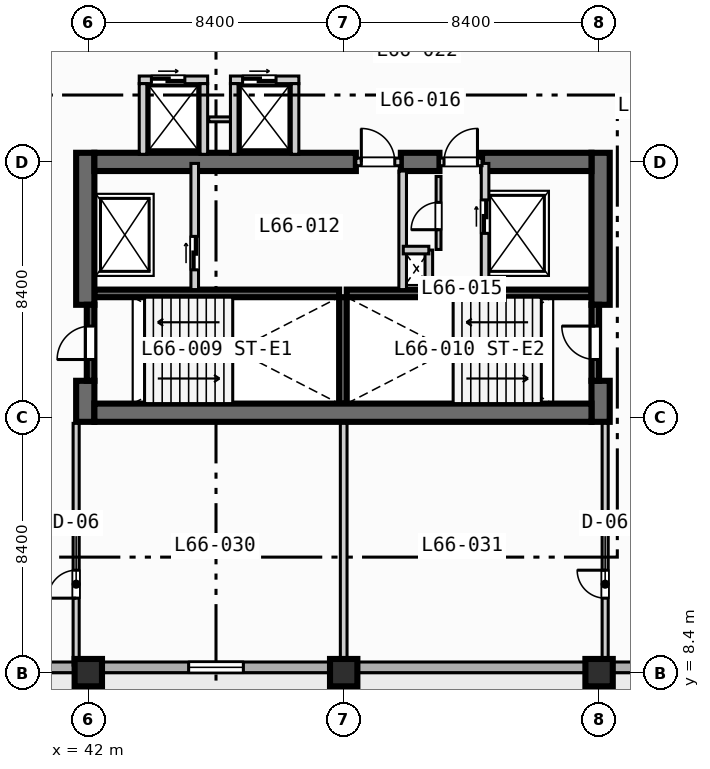
"""IFC4 building model, lengths in metres.
Left out: names, types, materials, properties, quantities, classifications, styles, units other than length and angle.
Written with IfcOpenShell. Run it as: python <this file> out.ifc"""

import sys

from ifc_helpers import new_model, si_unit, direction, frame, frame_2d, origin, origin_2d, place, context, subcontext, project, spatial, rectangle, extrude, element, fill, save


model = new_model("IFC4")
c1 = context("Model", 3, precision=1e-05, world=origin(), true_north=direction((0.0, 1.0)))
c2 = subcontext(c1, "Body", "Model", "MODEL_VIEW")
j1 = project(units=[si_unit("LENGTHUNIT", "METRE"), si_unit("PLANEANGLEUNIT", "RADIAN")], contexts=[c1])
p1 = place(None, origin())
s1 = spatial("IfcSite", under=j1, at=p1, CompositionType="ELEMENT")
p2 = place(p1, origin())
s2 = spatial("IfcBuilding", under=s1, at=p2, CompositionType="ELEMENT")
p3 = place(p2, frame((0.0, 0.0, 267.5)))
s3 = spatial("IfcBuildingStorey", under=s2, at=p3, CompositionType="ELEMENT", Elevation=267.5)
for number, where, z_axis, x_axis in (
    (1, (42.2, 20.875, 0.0), (0.0, 0.0, 1.0), (1.0, 0.0, 0.0)),
    (2, (50.5, 20.875, 0.0), (0.0, 0.0, 1.0), (1.0, 0.0, 0.0)),
):
    element("IfcWall", number, at=place(p3, frame(where, z_axis=z_axis, x_axis=x_axis)), inside=s3, PredefinedType="SOLIDWALL", context=c2, shape_type="SweptSolid", body=[
        extrude(rectangle(XDim=8.05, YDim=0.25, at=frame_2d((4.025, 0.0))), origin(), (0.0, 0.0, 1.0), 3.47),
    ])
p4 = place(p3, frame((50.375, 17.25, 0.0), z_axis=(0.0, 0.0, 1.0), x_axis=(0.0, 1.0, 0.0)))
e3 = element("IfcWall", 3, at=p4, inside=s3, PredefinedType="SOLIDWALL", context=c2, shape_type="SweptSolid", body=[
    extrude(rectangle(XDim=3.5, YDim=0.25, at=frame_2d((1.75, 0.0))), origin(), (0.0, 0.0, 1.0), 3.47),
])
p5 = place(p3, frame((41.9, 16.65, 0.0), z_axis=(0.0, 0.0, 1.0), x_axis=(0.0, 1.0, 0.0)))
e4 = element("IfcWall", 4, at=p5, inside=s3, PredefinedType="SHEAR", context=c2, shape_type="SweptSolid", body=[
    extrude(rectangle(XDim=1.35, YDim=0.6, at=frame_2d((0.675, 0.0))), origin(), (0.0, 0.0, 1.0), 3.47),
])
p6 = place(p3, frame((41.9, 20.5, 0.0), z_axis=(0.0, 0.0, 1.0), x_axis=(0.0, 1.0, 0.0)))
e5 = element("IfcWall", 5, at=p6, inside=s3, PredefinedType="SHEAR", context=c2, shape_type="SweptSolid", body=[
    extrude(rectangle(XDim=5.0, YDim=0.6, at=frame_2d((2.5, 0.0))), origin(), (0.0, 0.0, 1.0), 3.47),
])
p7 = place(p3, frame((58.85, 16.65, 0.0), z_axis=(0.0, 0.0, 1.0), x_axis=(0.0, 1.0, 0.0)))
e6 = element("IfcWall", 6, at=p7, inside=s3, PredefinedType="SHEAR", context=c2, shape_type="SweptSolid", body=[
    extrude(rectangle(XDim=1.35, YDim=0.6, at=frame_2d((0.675, 0.0))), origin(), (0.0, 0.0, 1.0), 3.47),
])
p8 = place(p3, frame((58.85, 20.5, 0.0), z_axis=(0.0, 0.0, 1.0), x_axis=(0.0, 1.0, 0.0)))
e7 = element("IfcWall", 7, at=p8, inside=s3, PredefinedType="SHEAR", context=c2, shape_type="SweptSolid", body=[
    extrude(rectangle(XDim=5.0, YDim=0.6, at=frame_2d((2.5, 0.0))), origin(), (0.0, 0.0, 1.0), 3.47),
])
p9 = place(p3, frame((42.2, 16.95, 0.0), z_axis=(0.0, 0.0, 1.0), x_axis=(1.0, 0.0, 0.0)))
e8 = element("IfcWall", 8, at=p9, inside=s3, PredefinedType="SHEAR", context=c2, shape_type="SweptSolid", body=[
    extrude(rectangle(XDim=16.35, YDim=0.6, at=frame_2d((8.175, 0.0))), origin(), (0.0, 0.0, 1.0), 3.47),
])
p10 = place(p3, frame((42.2, 25.2, 0.0), z_axis=(0.0, 0.0, 1.0), x_axis=(1.0, 0.0, 0.0)))
e9 = element("IfcWall", 9, at=p10, inside=s3, PredefinedType="SHEAR", context=c2, shape_type="SweptSolid", body=[
    extrude(rectangle(XDim=8.6, YDim=0.6, at=frame_2d((4.3, 0.0))), origin(), (0.0, 0.0, 1.0), 3.47),
])
p11 = place(p3, frame((52.28, 25.2, 0.0), z_axis=(0.0, 0.0, 1.0), x_axis=(1.0, 0.0, 0.0)))
e10 = element("IfcWall", 10, at=p11, inside=s3, PredefinedType="SHEAR", context=c2, shape_type="SweptSolid", body=[
    extrude(rectangle(XDim=1.27, YDim=0.6, at=frame_2d((0.635, 0.0))), origin(), (0.0, 0.0, 1.0), 3.47),
])
p12 = place(p3, frame((54.95, 25.2, 0.0), z_axis=(0.0, 0.0, 1.0), x_axis=(1.0, 0.0, 0.0)))
e11 = element("IfcWall", 11, at=p12, inside=s3, PredefinedType="SHEAR", context=c2, shape_type="SweptSolid", body=[
    extrude(rectangle(XDim=3.6, YDim=0.6, at=frame_2d((1.8, 0.0))), origin(), (0.0, 0.0, 1.0), 3.47),
])
for number, where, z_axis, x_axis in (
    (12, (42.0, 8.4, 0.0), (0.0, 0.0, 1.0), (1.0, 0.0, 0.0)),
    (13, (50.4, 8.4, 0.0), (0.0, 0.0, 1.0), (1.0, 0.0, 0.0)),
    (14, (58.8, 8.4, 0.0), (0.0, 0.0, 1.0), (1.0, 0.0, 0.0)),
):
    element("IfcColumn", number, at=place(p3, frame(where, z_axis=z_axis, x_axis=x_axis)), inside=s3, PredefinedType="COLUMN", context=c2, shape_type="SweptSolid", body=[
        extrude(rectangle(XDim=0.9, YDim=0.9, at=origin_2d()), origin(), (0.0, 0.0, 1.0), 3.7),
    ])
p13 = place(p3, frame((72.425, 8.575, 0.0), z_axis=(0.0, 0.0, 1.0), x_axis=(-1.0, 0.0, 0.0)))
e15 = element("IfcWall", 15, at=p13, inside=s3, PredefinedType="STANDARD", context=c2, shape_type="SweptSolid", body=[
    extrude(rectangle(XDim=60.85, YDim=0.35, at=frame_2d((30.425, 0.0))), origin(), (0.0, 0.0, 1.0), 3.47),
])
p14 = place(p13, frame((42.325, 0.0, 0.0)))
e16 = element("IfcOpeningElement", 16, at=p14, cuts=e15, PredefinedType="OPENING", context=c2, shape_type="SweptSolid", body=[
    extrude(rectangle(XDim=1.4, YDim=2.2, at=frame_2d((0.7, 1.1))), frame((0.0, 0.185, 0.0), z_axis=(0.0, -1.0, 0.0), x_axis=(1.0, 0.0, 0.0)), (0.0, 0.0, 1.0), 0.37),
])
p15 = place(p13, frame((33.425, 0.0, 0.85)))
e17 = element("IfcOpeningElement", 17, at=p15, cuts=e15, PredefinedType="OPENING", context=c2, shape_type="SweptSolid", body=[
    extrude(rectangle(XDim=2.4, YDim=1.95, at=frame_2d((1.2, 0.975))), frame((0.0, 0.185, 0.0), z_axis=(0.0, -1.0, 0.0), x_axis=(1.0, 0.0, 0.0)), (0.0, 0.0, 1.0), 0.37),
])
p16 = place(p13, frame((25.325, 0.0, 0.85)))
e18 = element("IfcOpeningElement", 18, at=p16, cuts=e15, PredefinedType="OPENING", context=c2, shape_type="SweptSolid", body=[
    extrude(rectangle(XDim=1.8, YDim=1.8, at=frame_2d((0.9, 0.9))), frame((0.0, 0.185, 0.0), z_axis=(0.0, -1.0, 0.0), x_axis=(1.0, 0.0, 0.0)), (0.0, 0.0, 1.0), 0.37),
])
p17 = place(p13, frame((50.215, 0.0, 0.85)))
e19 = element("IfcOpeningElement", 19, at=p17, cuts=e15, PredefinedType="OPENING", context=c2, shape_type="SweptSolid", body=[
    extrude(rectangle(XDim=1.8, YDim=1.8, at=frame_2d((0.9, 0.9))), frame((0.0, 0.185, 0.0), z_axis=(0.0, -1.0, 0.0), x_axis=(1.0, 0.0, 0.0)), (0.0, 0.0, 1.0), 0.37),
])
p18 = place(p13, frame((57.935, 0.0, 0.85)))
e20 = element("IfcOpeningElement", 20, at=p18, cuts=e15, PredefinedType="OPENING", context=c2, shape_type="SweptSolid", body=[
    extrude(rectangle(XDim=1.8, YDim=1.8, at=frame_2d((0.9, 0.9))), frame((0.0, 0.185, 0.0), z_axis=(0.0, -1.0, 0.0), x_axis=(1.0, 0.0, 0.0)), (0.0, 0.0, 1.0), 0.37),
])
p19 = place(p3, frame((42.075, 18.0, 0.0), z_axis=(0.0, 0.0, 1.0), x_axis=(0.0, 1.0, 0.0)))
e21 = element("IfcWall", 21, at=p19, inside=s3, PredefinedType="SOLIDWALL", context=c2, shape_type="SweptSolid", body=[
    extrude(rectangle(XDim=2.5, YDim=0.25, at=frame_2d((1.25, 0.0))), origin(), (0.0, 0.0, 1.0), 3.47),
])
p20 = place(p19, frame((0.7, 0.0, 0.0)))
e22 = element("IfcOpeningElement", 22, at=p20, cuts=e21, PredefinedType="OPENING", context=c2, shape_type="SweptSolid", body=[
    extrude(rectangle(XDim=1.1, YDim=2.15, at=frame_2d((0.55, 1.075))), frame((0.0, 0.135, 0.0), z_axis=(0.0, -1.0, 0.0), x_axis=(1.0, 0.0, 0.0)), (0.0, 0.0, 1.0), 0.27),
])
p21 = place(p3, frame((58.675, 18.0, 0.0), z_axis=(0.0, 0.0, 1.0), x_axis=(0.0, 1.0, 0.0)))
e23 = element("IfcWall", 23, at=p21, inside=s3, PredefinedType="SOLIDWALL", context=c2, shape_type="SweptSolid", body=[
    extrude(rectangle(XDim=2.5, YDim=0.25, at=frame_2d((1.25, 0.0))), origin(), (0.0, 0.0, 1.0), 3.47),
])
p22 = place(p21, frame((0.7, 0.0, 0.0)))
e24 = element("IfcOpeningElement", 24, at=p22, cuts=e23, PredefinedType="OPENING", context=c2, shape_type="SweptSolid", body=[
    extrude(rectangle(XDim=1.1, YDim=2.15, at=frame_2d((0.55, 1.075))), frame((0.0, 0.135, 0.0), z_axis=(0.0, -1.0, 0.0), x_axis=(1.0, 0.0, 0.0)), (0.0, 0.0, 1.0), 0.27),
])
p23 = place(p3, frame((45.5, 21.0, 0.0), z_axis=(0.0, 0.0, 1.0), x_axis=(0.0, 1.0, 0.0)))
e25 = element("IfcWall", 25, at=p23, inside=s3, PredefinedType="SOLIDWALL", context=c2, shape_type="SweptSolid", body=[
    extrude(rectangle(XDim=4.15, YDim=0.25, at=frame_2d((2.075, 0.0))), origin(), (0.0, 0.0, 1.0), 3.47),
])
p24 = place(p23, frame((0.65, 0.0, 0.0)))
e26 = element("IfcOpeningElement", 26, at=p24, cuts=e25, PredefinedType="OPENING", context=c2, shape_type="SweptSolid", body=[
    extrude(rectangle(XDim=1.1, YDim=2.15, at=frame_2d((0.55, 1.075))), frame((0.0, 0.135, 0.0), z_axis=(0.0, -1.0, 0.0), x_axis=(1.0, 0.0, 0.0)), (0.0, 0.0, 1.0), 0.27),
])
p25 = place(p3, frame((50.8, 25.2, 0.0), z_axis=(0.0, 0.0, 1.0), x_axis=(1.0, 0.0, 0.0)))
e27 = element("IfcWall", 27, at=p25, inside=s3, PredefinedType="SOLIDWALL", context=c2, shape_type="SweptSolid", body=[
    extrude(rectangle(XDim=1.48, YDim=0.25, at=frame_2d((0.74, 0.0))), origin(), (0.0, 0.0, 1.0), 3.47),
])
p26 = place(p25, frame((0.18, 0.0, 0.0)))
e28 = element("IfcOpeningElement", 28, at=p26, cuts=e27, PredefinedType="OPENING", context=c2, shape_type="SweptSolid", body=[
    extrude(rectangle(XDim=1.1, YDim=2.15, at=frame_2d((0.55, 1.075))), frame((0.0, 0.135, 0.0), z_axis=(0.0, -1.0, 0.0), x_axis=(1.0, 0.0, 0.0)), (0.0, 0.0, 1.0), 0.27),
])
p27 = place(p3, frame((52.34, 21.0, 0.0), z_axis=(0.0, 0.0, 1.0), x_axis=(0.0, 1.0, 0.0)))
e29 = element("IfcWall", 29, at=p27, inside=s3, PredefinedType="SOLIDWALL", context=c2, shape_type="SweptSolid", body=[
    extrude(rectangle(XDim=3.9, YDim=0.25, at=frame_2d((1.95, 0.0))), origin(), (0.0, 0.0, 1.0), 3.47),
])
p28 = place(p3, frame((55.05, 21.0, 0.0), z_axis=(0.0, 0.0, 1.0), x_axis=(0.0, 1.0, 0.0)))
e30 = element("IfcWall", 30, at=p28, inside=s3, PredefinedType="SOLIDWALL", context=c2, shape_type="SweptSolid", body=[
    extrude(rectangle(XDim=4.15, YDim=0.25, at=frame_2d((2.075, 0.0))), origin(), (0.0, 0.0, 1.0), 3.47),
])
p29 = place(p28, frame((1.85, 0.0, 0.0)))
e31 = element("IfcOpeningElement", 31, at=p29, cuts=e30, PredefinedType="OPENING", context=c2, shape_type="SweptSolid", body=[
    extrude(rectangle(XDim=1.1, YDim=2.15, at=frame_2d((0.55, 1.075))), frame((0.0, 0.135, 0.0), z_axis=(0.0, -1.0, 0.0), x_axis=(1.0, 0.0, 0.0)), (0.0, 0.0, 1.0), 0.27),
])
p30 = place(p3, frame((53.55, 25.2, 0.0), z_axis=(0.0, 0.0, 1.0), x_axis=(1.0, 0.0, 0.0)))
e32 = element("IfcWall", 32, at=p30, inside=s3, PredefinedType="SOLIDWALL", context=c2, shape_type="SweptSolid", body=[
    extrude(rectangle(XDim=1.4, YDim=0.25, at=frame_2d((0.7, 0.0))), origin(), (0.0, 0.0, 1.0), 3.47),
])
p31 = place(p30, frame((0.15, 0.0, 0.0)))
e33 = element("IfcOpeningElement", 33, at=p31, cuts=e32, PredefinedType="OPENING", context=c2, shape_type="SweptSolid", body=[
    extrude(rectangle(XDim=1.1, YDim=2.15, at=frame_2d((0.55, 1.075))), frame((0.0, 0.135, 0.0), z_axis=(0.0, -1.0, 0.0), x_axis=(1.0, 0.0, 0.0)), (0.0, 0.0, 1.0), 0.27),
])
p32 = place(p3, frame((53.2, 21.0, 0.0), z_axis=(0.0, 0.0, 1.0), x_axis=(0.0, 1.0, 0.0)))
e34 = element("IfcWall", 34, at=p32, inside=s3, PredefinedType="SOLIDWALL", context=c2, shape_type="SweptSolid", body=[
    extrude(rectangle(XDim=1.3, YDim=0.25, at=frame_2d((0.65, 0.0))), origin(), (0.0, 0.0, 1.0), 3.47),
])
p33 = place(p3, frame((52.36, 22.3, 0.0), z_axis=(0.0, 0.0, 1.0), x_axis=(1.0, 0.0, 0.0)))
e35 = element("IfcWall", 35, at=p33, inside=s3, PredefinedType="SOLIDWALL", context=c2, shape_type="SweptSolid", body=[
    extrude(rectangle(XDim=0.84, YDim=0.25, at=frame_2d((0.42, 0.0))), origin(), (0.0, 0.0, 1.0), 3.47),
])
p34 = place(p3, frame((53.52, 22.32, 0.0), z_axis=(0.0, 0.0, 1.0), x_axis=(0.0, 1.0, 0.0)))
e36 = element("IfcWall", 36, at=p34, inside=s3, PredefinedType="PARTITIONING", context=c2, shape_type="SweptSolid", body=[
    extrude(rectangle(XDim=2.4, YDim=0.16, at=frame_2d((1.2, 0.0))), origin(), (0.0, 0.0, 1.0), 3.47),
])
p35 = place(p34, frame((0.65, 0.0, 0.0)))
e37 = element("IfcOpeningElement", 37, at=p35, cuts=e36, PredefinedType="OPENING", context=c2, shape_type="SweptSolid", body=[
    extrude(rectangle(XDim=0.9, YDim=2.1, at=frame_2d((0.45, 1.05))), frame((0.0, 0.09, 0.0), z_axis=(0.0, -1.0, 0.0), x_axis=(1.0, 0.0, 0.0)), (0.0, 0.0, 1.0), 0.18),
])
p36 = place(p3, frame((43.675, 27.9, 0.0), z_axis=(0.0, 0.0, 1.0), x_axis=(1.0, 0.0, 0.0)))
e38 = element("IfcWall", 38, at=p36, inside=s3, PredefinedType="SOLIDWALL", context=c2, shape_type="SweptSolid", body=[
    extrude(rectangle(XDim=2.25, YDim=0.25, at=frame_2d((1.125, 0.0))), origin(), (0.0, 0.0, 1.0), 3.47),
])
p37 = place(p36, frame((0.4, 0.0, 0.0)))
e39 = element("IfcOpeningElement", 39, at=p37, cuts=e38, PredefinedType="OPENING", context=c2, shape_type="SweptSolid", body=[
    extrude(rectangle(XDim=1.1, YDim=2.15, at=frame_2d((0.55, 1.075))), frame((0.0, 0.135, 0.0), z_axis=(0.0, -1.0, 0.0), x_axis=(1.0, 0.0, 0.0)), (0.0, 0.0, 1.0), 0.27),
])
for number, where, z_axis, x_axis in (
    (40, (43.8, 25.45, 0.0), (0.0, 0.0, 1.0), (0.0, 1.0, 0.0)),
    (41, (45.8, 25.45, 0.0), (0.0, 0.0, 1.0), (0.0, 1.0, 0.0)),
):
    element("IfcWall", number, at=place(p3, frame(where, z_axis=z_axis, x_axis=x_axis)), inside=s3, PredefinedType="SOLIDWALL", context=c2, shape_type="SweptSolid", body=[
        extrude(rectangle(XDim=2.325, YDim=0.25, at=frame_2d((1.163, 0.0))), origin(), (0.0, 0.0, 1.0), 3.47),
    ])
p38 = place(p3, frame((45.96, 26.6, 0.0), z_axis=(0.0, 0.0, 1.0), x_axis=(1.0, 0.0, 0.0)))
e42 = element("IfcWall", 42, at=p38, inside=s3, PredefinedType="PARTITIONING", context=c2, shape_type="SweptSolid", body=[
    extrude(rectangle(XDim=0.88, YDim=0.16, at=frame_2d((0.44, 0.0))), origin(), (0.0, 0.0, 1.0), 3.47),
])
p39 = place(p3, frame((46.675, 27.9, 0.0), z_axis=(0.0, 0.0, 1.0), x_axis=(1.0, 0.0, 0.0)))
e43 = element("IfcWall", 43, at=p39, inside=s3, PredefinedType="SOLIDWALL", context=c2, shape_type="SweptSolid", body=[
    extrude(rectangle(XDim=2.25, YDim=0.25, at=frame_2d((1.125, 0.0))), origin(), (0.0, 0.0, 1.0), 3.47),
])
p40 = place(p39, frame((0.4, 0.0, 0.0)))
e44 = element("IfcOpeningElement", 44, at=p40, cuts=e43, PredefinedType="OPENING", context=c2, shape_type="SweptSolid", body=[
    extrude(rectangle(XDim=1.1, YDim=2.15, at=frame_2d((0.55, 1.075))), frame((0.0, 0.135, 0.0), z_axis=(0.0, -1.0, 0.0), x_axis=(1.0, 0.0, 0.0)), (0.0, 0.0, 1.0), 0.27),
])
for number, where, z_axis, x_axis in (
    (45, (46.8, 25.45, 0.0), (0.0, 0.0, 1.0), (0.0, 1.0, 0.0)),
    (46, (48.8, 25.45, 0.0), (0.0, 0.0, 1.0), (0.0, 1.0, 0.0)),
):
    element("IfcWall", number, at=place(p3, frame(where, z_axis=z_axis, x_axis=x_axis)), inside=s3, PredefinedType="SOLIDWALL", context=c2, shape_type="SweptSolid", body=[
        extrude(rectangle(XDim=2.325, YDim=0.25, at=frame_2d((1.163, 0.0))), origin(), (0.0, 0.0, 1.0), 3.47),
    ])
p41 = place(p3, frame((41.6, 8.65, 0.0), z_axis=(0.0, 0.0, 1.0), x_axis=(0.0, 1.0, 0.0)))
e47 = element("IfcWall", 47, at=p41, inside=s3, PredefinedType="PARTITIONING", context=c2, shape_type="SweptSolid", body=[
    extrude(rectangle(XDim=7.95, YDim=0.2, at=frame_2d((3.975, 0.0))), origin(), (0.0, 0.0, 1.0), 3.47),
])
p42 = place(p41, frame((2.2, 0.0, 0.0)))
e48 = element("IfcOpeningElement", 48, at=p42, cuts=e47, PredefinedType="OPENING", context=c2, shape_type="SweptSolid", body=[
    extrude(rectangle(XDim=0.92, YDim=2.1, at=frame_2d((0.46, 1.05))), frame((0.0, 0.11, 0.0), z_axis=(0.0, -1.0, 0.0), x_axis=(1.0, 0.0, 0.0)), (0.0, 0.0, 1.0), 0.22),
])
p43 = place(p3, frame((59.0, 8.65, 0.0), z_axis=(0.0, 0.0, 1.0), x_axis=(0.0, 1.0, 0.0)))
e49 = element("IfcWall", 49, at=p43, inside=s3, PredefinedType="PARTITIONING", context=c2, shape_type="SweptSolid", body=[
    extrude(rectangle(XDim=7.95, YDim=0.2, at=frame_2d((3.975, 0.0))), origin(), (0.0, 0.0, 1.0), 3.007),
])
p44 = place(p43, frame((2.2, 0.0, 0.0)))
e50 = element("IfcOpeningElement", 50, at=p44, cuts=e49, PredefinedType="OPENING", context=c2, shape_type="SweptSolid", body=[
    extrude(rectangle(XDim=0.92, YDim=2.1, at=frame_2d((0.46, 1.05))), frame((0.0, 0.11, 0.0), z_axis=(0.0, -1.0, 0.0), x_axis=(1.0, 0.0, 0.0)), (0.0, 0.0, 1.0), 0.22),
])
p45 = place(p3, frame((50.4, 8.65, 0.0), z_axis=(0.0, 0.0, 1.0), x_axis=(0.0, 1.0, 0.0)))
e51 = element("IfcWall", 51, at=p45, inside=s3, PredefinedType="PARTITIONING", context=c2, shape_type="SweptSolid", body=[
    extrude(rectangle(XDim=7.95, YDim=0.22, at=frame_2d((3.975, 0.0))), origin(), (0.0, 0.0, 1.0), 2.82),
])
p46 = place(p16, origin())
e52 = element("IfcWindow", 52, at=p46, inside=s3, PartitioningType="SINGLE_PANEL", PredefinedType="WINDOW", context=c2, shape_type="SweptSolid", body=[
    extrude(rectangle(XDim=1.8, YDim=1.8, at=frame_2d((0.9, 0.9))), frame((0.0, 0.03, 0.0), z_axis=(0.0, -1.0, 0.0), x_axis=(1.0, 0.0, 0.0)), (0.0, 0.0, 1.0), 0.06),
])
fill(e18, e52)
p47 = place(p20, origin())
e53 = element("IfcDoor", 53, at=p47, inside=s3, OperationType="SINGLE_SWING_LEFT", PredefinedType="DOOR", context=c2, shape_type="SweptSolid", body=[
    extrude(rectangle(XDim=1.1, YDim=2.15, at=frame_2d((0.55, 1.075))), frame((0.0, 0.025, 0.0), z_axis=(0.0, -1.0, 0.0), x_axis=(1.0, 0.0, 0.0)), (0.0, 0.0, 1.0), 0.05),
])
fill(e22, e53)
p48 = place(p22, origin())
e54 = element("IfcDoor", 54, at=p48, inside=s3, OperationType="SINGLE_SWING_RIGHT", PredefinedType="DOOR", context=c2, shape_type="SweptSolid", body=[
    extrude(rectangle(XDim=1.1, YDim=2.15, at=frame_2d((0.55, 1.075))), frame((0.0, 0.025, 0.0), z_axis=(0.0, -1.0, 0.0), x_axis=(1.0, 0.0, 0.0)), (0.0, 0.0, 1.0), 0.05),
])
fill(e24, e54)
p49 = place(p24, origin())
e55 = element("IfcDoor", 55, at=p49, inside=s3, OperationType="SLIDING_TO_LEFT", PredefinedType="DOOR", context=c2, shape_type="SweptSolid", body=[
    extrude(rectangle(XDim=1.1, YDim=2.15, at=frame_2d((0.55, 1.075))), frame((0.0, 0.025, 0.0), z_axis=(0.0, -1.0, 0.0), x_axis=(1.0, 0.0, 0.0)), (0.0, 0.0, 1.0), 0.05),
])
fill(e26, e55)
p50 = place(p26, origin())
e56 = element("IfcDoor", 56, at=p50, inside=s3, OperationType="SINGLE_SWING_LEFT", PredefinedType="DOOR", context=c2, shape_type="SweptSolid", body=[
    extrude(rectangle(XDim=1.1, YDim=2.15, at=frame_2d((0.55, 1.075))), frame((0.0, 0.025, 0.0), z_axis=(0.0, -1.0, 0.0), x_axis=(1.0, 0.0, 0.0)), (0.0, 0.0, 1.0), 0.05),
])
fill(e28, e56)
p51 = place(p29, origin())
e57 = element("IfcDoor", 57, at=p51, inside=s3, OperationType="SLIDING_TO_LEFT", PredefinedType="DOOR", context=c2, shape_type="SweptSolid", body=[
    extrude(rectangle(XDim=1.1, YDim=2.15, at=frame_2d((0.55, 1.075))), frame((0.0, 0.025, 0.0), z_axis=(0.0, -1.0, 0.0), x_axis=(1.0, 0.0, 0.0)), (0.0, 0.0, 1.0), 0.05),
])
fill(e31, e57)
p52 = place(p31, origin())
e58 = element("IfcDoor", 58, at=p52, inside=s3, OperationType="SINGLE_SWING_RIGHT", PredefinedType="DOOR", context=c2, shape_type="SweptSolid", body=[
    extrude(rectangle(XDim=1.1, YDim=2.15, at=frame_2d((0.55, 1.075))), frame((0.0, 0.025, 0.0), z_axis=(0.0, -1.0, 0.0), x_axis=(1.0, 0.0, 0.0)), (0.0, 0.0, 1.0), 0.05),
])
fill(e33, e58)
p53 = place(p35, origin())
e59 = element("IfcDoor", 59, at=p53, inside=s3, OperationType="SINGLE_SWING_LEFT", PredefinedType="DOOR", context=c2, shape_type="SweptSolid", body=[
    extrude(rectangle(XDim=0.9, YDim=2.1, at=frame_2d((0.45, 1.05))), frame((0.0, 0.025, 0.0), z_axis=(0.0, -1.0, 0.0), x_axis=(1.0, 0.0, 0.0)), (0.0, 0.0, 1.0), 0.05),
])
fill(e37, e59)
p54 = place(p37, origin())
e60 = element("IfcDoor", 60, at=p54, inside=s3, OperationType="SLIDING_TO_LEFT", PredefinedType="DOOR", context=c2, shape_type="SweptSolid", body=[
    extrude(rectangle(XDim=1.1, YDim=2.15, at=frame_2d((0.55, 1.075))), frame((0.0, 0.025, 0.0), z_axis=(0.0, -1.0, 0.0), x_axis=(1.0, 0.0, 0.0)), (0.0, 0.0, 1.0), 0.05),
])
fill(e39, e60)
p55 = place(p40, origin())
e61 = element("IfcDoor", 61, at=p55, inside=s3, OperationType="SLIDING_TO_LEFT", PredefinedType="DOOR", context=c2, shape_type="SweptSolid", body=[
    extrude(rectangle(XDim=1.1, YDim=2.15, at=frame_2d((0.55, 1.075))), frame((0.0, 0.025, 0.0), z_axis=(0.0, -1.0, 0.0), x_axis=(1.0, 0.0, 0.0)), (0.0, 0.0, 1.0), 0.05),
])
fill(e44, e61)
p56 = place(p42, origin())
e62 = element("IfcDoor", 62, at=p56, inside=s3, OperationType="SINGLE_SWING_LEFT", PredefinedType="DOOR", context=c2, shape_type="SweptSolid", body=[
    extrude(rectangle(XDim=0.92, YDim=2.1, at=frame_2d((0.46, 1.05))), frame((0.0, 0.025, 0.0), z_axis=(0.0, -1.0, 0.0), x_axis=(1.0, 0.0, 0.0)), (0.0, 0.0, 1.0), 0.05),
])
fill(e48, e62)
p57 = place(p44, origin())
e63 = element("IfcDoor", 63, at=p57, inside=s3, OperationType="SINGLE_SWING_RIGHT", PredefinedType="DOOR", context=c2, shape_type="SweptSolid", body=[
    extrude(rectangle(XDim=0.92, YDim=2.1, at=frame_2d((0.46, 1.05))), frame((0.0, 0.025, 0.0), z_axis=(0.0, -1.0, 0.0), x_axis=(1.0, 0.0, 0.0)), (0.0, 0.0, 1.0), 0.05),
])
fill(e50, e63)
save(model, sys.argv[1])
